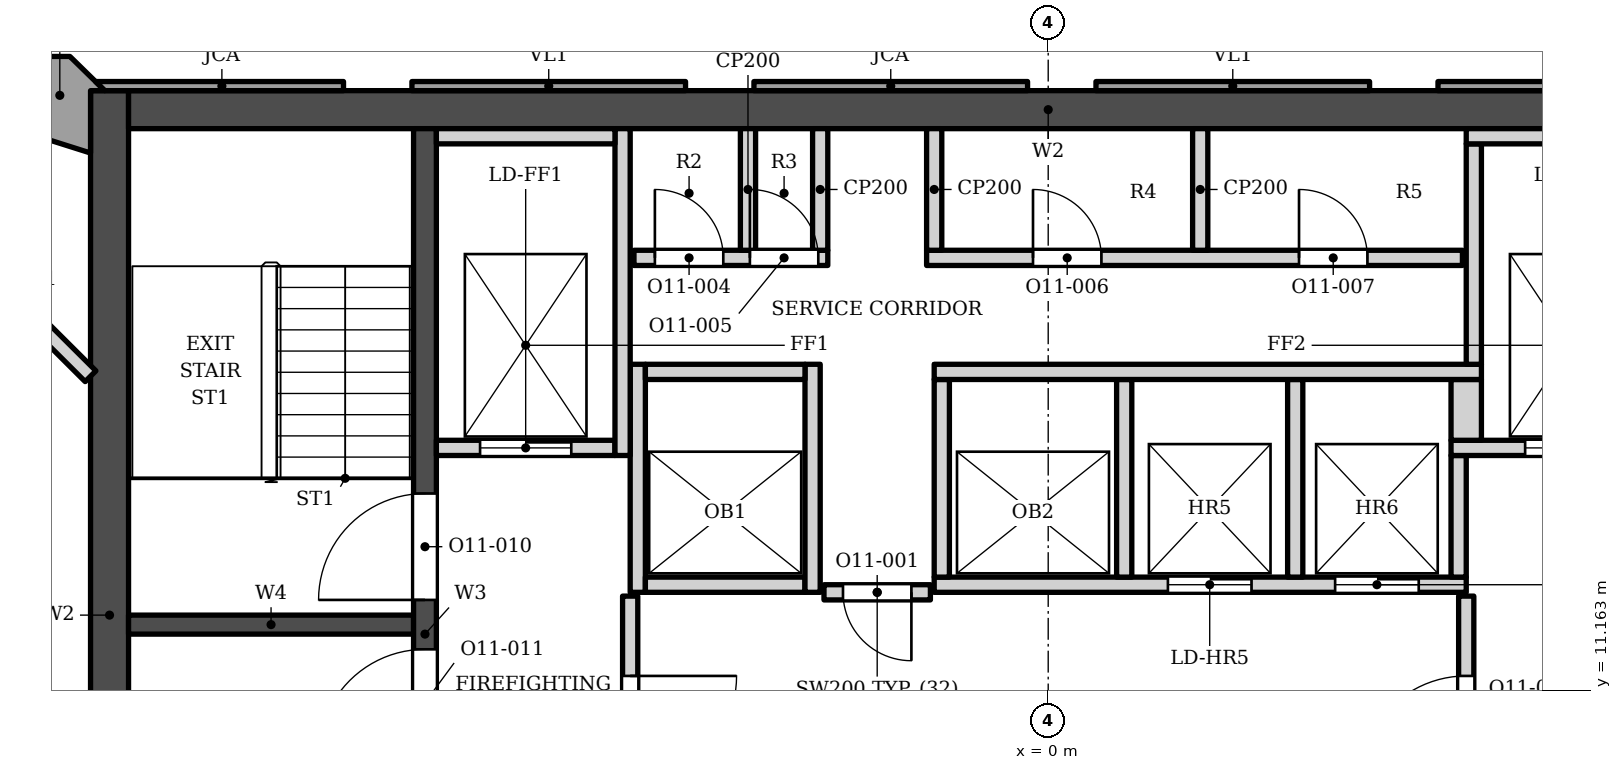
"""IFC4 building model, lengths in metres.
Left out: names, types, materials, properties, quantities, classifications, styles, units other than length and angle.
Written with IfcOpenShell. Run it as: python <this file> out.ifc"""

import sys

from ifc_helpers import new_model, si_unit, direction, frame, frame_2d, origin, place, context, subcontext, project, spatial, polyline, rectangle, outline, extrude, element, fill, save


model = new_model("IFC4")
c1 = context("Model", 3, precision=1e-05, world=origin(), true_north=direction((0.0, 1.0)))
c2 = subcontext(c1, "Body", "Model", "MODEL_VIEW")
j1 = project(units=[si_unit("LENGTHUNIT", "METRE"), si_unit("PLANEANGLEUNIT", "RADIAN")], contexts=[c1])
p1 = place(None, origin())
s1 = spatial("IfcSite", under=j1, at=p1, CompositionType="ELEMENT")
p2 = place(p1, origin())
s2 = spatial("IfcBuilding", under=s1, at=p2, CompositionType="ELEMENT")
p3 = place(p2, frame((0.0, 0.0, 271.6)))
s3 = spatial("IfcBuildingStorey", under=s2, at=p3, CompositionType="ELEMENT", Elevation=271.6)
p4 = place(p3, frame((-12.1, 18.802, 0.0), z_axis=(0.0, 0.0, 1.0), x_axis=(1.0, 0.0, 0.0)))
e1 = element("IfcWall", 1, at=p4, inside=s3, PredefinedType="SHEAR", context=c2, shape_type="SweptSolid", body=[
    extrude(rectangle(XDim=24.2, YDim=0.5, at=frame_2d((12.1, 0.0))), origin(), (0.0, 0.0, 1.0), 3.9),
])
p5 = place(p3, frame((-12.35, 5.253, 0.0), z_axis=(0.0, 0.0, 1.0), x_axis=(0.0, 1.0, 0.0)))
e2 = element("IfcWall", 2, at=p5, inside=s3, PredefinedType="SHEAR", context=c2, shape_type="SweptSolid", body=[
    extrude(rectangle(XDim=13.8, YDim=0.5, at=frame_2d((6.9, 0.0))), origin(), (0.0, 0.0, 1.0), 3.9),
])
p6 = place(p3, frame((-8.2, 5.253, 0.0), z_axis=(0.0, 0.0, 1.0), x_axis=(0.0, 1.0, 0.0)))
e3 = element("IfcWall", 3, at=p6, inside=s3, PredefinedType="SHEAR", context=c2, shape_type="SweptSolid", body=[
    extrude(rectangle(XDim=13.3, YDim=0.3, at=frame_2d((6.65, 0.0))), origin(), (0.0, 0.0, 1.0), 3.9),
])
p7 = place(p6, frame((7.1, 0.0, 0.0)))
e4 = element("IfcOpeningElement", 4, at=p7, cuts=e3, PredefinedType="OPENING", context=c2, shape_type="SweptSolid", body=[
    extrude(rectangle(XDim=1.4, YDim=2.1, at=frame_2d((0.7, 1.05))), frame((0.0, 0.16, 0.0), z_axis=(0.0, -1.0, 0.0), x_axis=(1.0, 0.0, 0.0)), (0.0, 0.0, 1.0), 0.32),
])
p8 = place(p6, frame((5.05, 0.0, 0.0)))
e5 = element("IfcOpeningElement", 5, at=p8, cuts=e3, PredefinedType="OPENING", context=c2, shape_type="SweptSolid", body=[
    extrude(rectangle(XDim=1.4, YDim=2.1, at=frame_2d((0.7, 1.05))), frame((0.0, 0.16, 0.0), z_axis=(0.0, -1.0, 0.0), x_axis=(1.0, 0.0, 0.0)), (0.0, 0.0, 1.0), 0.32),
])
p9 = place(p3, frame((-12.1, 12.028, 0.0), z_axis=(0.0, 0.0, 1.0), x_axis=(1.0, 0.0, 0.0)))
e6 = element("IfcWall", 6, at=p9, inside=s3, PredefinedType="SHEAR", context=c2, shape_type="SweptSolid", body=[
    extrude(rectangle(XDim=3.75, YDim=0.25, at=frame_2d((1.875, 0.0))), origin(), (0.0, 0.0, 1.0), 3.9),
])
p10 = place(p3, origin())
e7 = element("IfcWall", 7, at=p10, inside=s3, PredefinedType="SOLIDWALL", context=c2, shape_type="SweptSolid", body=[
    extrude(outline(polyline([(-12.412, 19.052), (-12.872, 19.502), (-13.771, 19.502), (-13.771, 18.603), (-12.6, 18.232), (-12.6, 19.052), (-12.412, 19.052)])), origin(), (0.0, 0.0, 1.0), 3.0),
])
p11 = place(p3, origin())
e8 = element("IfcWall", 8, at=p11, inside=s3, PredefinedType="SOLIDWALL", context=c2, shape_type="SweptSolid", body=[
    extrude(outline(polyline([(5.128, 19.173), (5.128, 19.052), (8.729, 19.052), (8.729, 19.173), (5.128, 19.173)])), origin(), (0.0, 0.0, 1.0), 3.0),
])
p12 = place(p3, origin())
e9 = element("IfcWall", 9, at=p12, inside=s3, PredefinedType="ELEMENTEDWALL", context=c2, shape_type="SweptSolid", body=[
    extrude(outline(polyline([(0.628, 19.173), (0.628, 19.052), (4.229, 19.052), (4.229, 19.173), (0.628, 19.173)])), origin(), (0.0, 0.0, 1.0), 3.0),
])
p13 = place(p3, origin())
e10 = element("IfcWall", 10, at=p13, inside=s3, PredefinedType="SOLIDWALL", context=c2, shape_type="SweptSolid", body=[
    extrude(outline(polyline([(-3.872, 19.173), (-3.872, 19.052), (-0.271, 19.052), (-0.271, 19.173), (-3.872, 19.173)])), origin(), (0.0, 0.0, 1.0), 3.0),
])
p14 = place(p3, origin())
e11 = element("IfcWall", 11, at=p14, inside=s3, PredefinedType="ELEMENTEDWALL", context=c2, shape_type="SweptSolid", body=[
    extrude(outline(polyline([(-8.372, 19.173), (-8.372, 19.052), (-4.771, 19.052), (-4.771, 19.173), (-8.372, 19.173)])), origin(), (0.0, 0.0, 1.0), 3.0),
])
p15 = place(p3, origin())
e12 = element("IfcWall", 12, at=p15, inside=s3, PredefinedType="SOLIDWALL", context=c2, shape_type="SweptSolid", body=[
    extrude(outline(polyline([(-12.411, 19.052), (-9.271, 19.052), (-9.271, 19.173), (-12.533, 19.173), (-12.411, 19.052)])), origin(), (0.0, 0.0, 1.0), 3.0),
])
p16 = place(p3, frame((-5.5, 9.103, 0.0), z_axis=(0.0, 0.0, 1.0), x_axis=(0.0, 1.0, 0.0)))
e13 = element("IfcWall", 13, at=p16, inside=s3, PredefinedType="SOLIDWALL", context=c2, shape_type="SweptSolid", body=[
    extrude(rectangle(XDim=3.3, YDim=0.2, at=frame_2d((1.65, 0.0))), origin(), (0.0, 0.0, 1.0), 3.73),
])
p17 = place(p16, frame((0.85, 0.0, 0.0)))
e14 = element("IfcOpeningElement", 14, at=p17, cuts=e13, PredefinedType="OPENING", context=c2, shape_type="SweptSolid", body=[
    extrude(rectangle(XDim=1.4, YDim=2.1, at=frame_2d((0.7, 1.05))), frame((0.0, 0.11, 0.0), z_axis=(0.0, -1.0, 0.0), x_axis=(1.0, 0.0, 0.0)), (0.0, 0.0, 1.0), 0.22),
])
p18 = place(p3, frame((5.5, 9.103, 0.0), z_axis=(0.0, 0.0, 1.0), x_axis=(0.0, 1.0, 0.0)))
e15 = element("IfcWall", 15, at=p18, inside=s3, PredefinedType="SOLIDWALL", context=c2, shape_type="SweptSolid", body=[
    extrude(rectangle(XDim=3.3, YDim=0.2, at=frame_2d((1.65, 0.0))), origin(), (0.0, 0.0, 1.0), 3.73),
])
p19 = place(p18, frame((0.85, 0.0, 0.0)))
e16 = element("IfcOpeningElement", 16, at=p19, cuts=e15, PredefinedType="OPENING", context=c2, shape_type="SweptSolid", body=[
    extrude(rectangle(XDim=1.4, YDim=2.1, at=frame_2d((0.7, 1.05))), frame((0.0, 0.11, 0.0), z_axis=(0.0, -1.0, 0.0), x_axis=(1.0, 0.0, 0.0)), (0.0, 0.0, 1.0), 0.22),
])
p20 = place(p3, frame((-2.95, 12.453, 0.0), z_axis=(0.0, 0.0, 1.0), x_axis=(1.0, 0.0, 0.0)))
e17 = element("IfcWall", 17, at=p20, inside=s3, PredefinedType="SOLIDWALL", context=c2, shape_type="SweptSolid", body=[
    extrude(rectangle(XDim=1.4, YDim=0.2, at=frame_2d((0.7, 0.0))), origin(), (0.0, 0.0, 1.0), 3.73),
])
p21 = place(p20, frame((0.25, 0.0, 0.0)))
e18 = element("IfcOpeningElement", 18, at=p21, cuts=e17, PredefinedType="OPENING", context=c2, shape_type="SweptSolid", body=[
    extrude(rectangle(XDim=0.9, YDim=2.1, at=frame_2d((0.45, 1.05))), frame((0.0, 0.11, 0.0), z_axis=(0.0, -1.0, 0.0), x_axis=(1.0, 0.0, 0.0)), (0.0, 0.0, 1.0), 0.22),
])
p22 = place(p3, frame((-5.4, 12.453, 0.0), z_axis=(0.0, 0.0, 1.0), x_axis=(0.0, 1.0, 0.0)))
e19 = element("IfcWall", 19, at=p22, inside=s3, PredefinedType="SOLIDWALL", context=c2, shape_type="SweptSolid", body=[
    extrude(rectangle(XDim=3.0, YDim=0.2, at=frame_2d((1.5, 0.0))), origin(), (0.0, 0.0, 1.0), 3.73),
])
p23 = place(p3, frame((-5.3, 12.552, 0.0), z_axis=(0.0, 0.0, 1.0), x_axis=(1.0, 0.0, 0.0)))
e20 = element("IfcWall", 20, at=p23, inside=s3, PredefinedType="SOLIDWALL", context=c2, shape_type="SweptSolid", body=[
    extrude(rectangle(XDim=2.1, YDim=0.2, at=frame_2d((1.05, 0.0))), origin(), (0.0, 0.0, 1.0), 3.73),
])
p24 = place(p3, frame((-3.1, 12.453, 0.0), z_axis=(0.0, 0.0, 1.0), x_axis=(0.0, 1.0, 0.0)))
e21 = element("IfcWall", 21, at=p24, inside=s3, PredefinedType="SOLIDWALL", context=c2, shape_type="SweptSolid", body=[
    extrude(rectangle(XDim=3.0, YDim=0.2, at=frame_2d((1.5, 0.0))), origin(), (0.0, 0.0, 1.0), 3.73),
])
p25 = place(p3, frame((-1.5, 12.552, 0.0), z_axis=(0.0, 0.0, 1.0), x_axis=(1.0, 0.0, 0.0)))
e22 = element("IfcWall", 22, at=p25, inside=s3, PredefinedType="SOLIDWALL", context=c2, shape_type="SweptSolid", body=[
    extrude(rectangle(XDim=7.0, YDim=0.2, at=frame_2d((3.5, 0.0))), origin(), (0.0, 0.0, 1.0), 3.73),
])
p26 = place(p25, frame((3.075, 0.0, 0.0)))
e23 = element("IfcOpeningElement", 23, at=p26, cuts=e22, PredefinedType="OPENING", context=c2, shape_type="SweptSolid", body=[
    extrude(rectangle(XDim=1.1, YDim=2.1, at=frame_2d((0.55, 1.05))), frame((0.0, 0.11, 0.0), z_axis=(0.0, -1.0, 0.0), x_axis=(1.0, 0.0, 0.0)), (0.0, 0.0, 1.0), 0.22),
])
p27 = place(p25, frame((5.275, 0.0, 0.0)))
e24 = element("IfcOpeningElement", 24, at=p27, cuts=e22, PredefinedType="OPENING", context=c2, shape_type="SweptSolid", body=[
    extrude(rectangle(XDim=1.1, YDim=2.1, at=frame_2d((0.55, 1.05))), frame((0.0, 0.11, 0.0), z_axis=(0.0, -1.0, 0.0), x_axis=(1.0, 0.0, 0.0)), (0.0, 0.0, 1.0), 0.22),
])
for number, where, z_axis, x_axis in (
    (25, (-1.4, 12.653, 0.0), (0.0, 0.0, 1.0), (0.0, 1.0, 0.0)),
    (26, (1.0, 12.653, 0.0), (0.0, 0.0, 1.0), (0.0, 1.0, 0.0)),
    (27, (3.25, 12.653, 0.0), (0.0, 0.0, 1.0), (0.0, 1.0, 0.0)),
):
    element("IfcWall", number, at=place(p3, frame(where, z_axis=z_axis, x_axis=x_axis)), inside=s3, PredefinedType="SOLIDWALL", context=c2, shape_type="SweptSolid", body=[
        extrude(rectangle(XDim=2.6, YDim=0.2, at=frame_2d((1.3, 0.0))), origin(), (0.0, 0.0, 1.0), 3.73),
    ])
p28 = place(p3, frame((5.4, 12.653, 0.0), z_axis=(0.0, 0.0, 1.0), x_axis=(0.0, 1.0, 0.0)))
e28 = element("IfcWall", 28, at=p28, inside=s3, PredefinedType="SOLIDWALL", context=c2, shape_type="SweptSolid", body=[
    extrude(rectangle(XDim=1.6, YDim=0.2, at=frame_2d((0.8, 0.0))), origin(), (0.0, 0.0, 1.0), 3.73),
])
p29 = place(p3, frame((-8.05, 14.353, 0.0), z_axis=(0.0, 0.0, 1.0), x_axis=(1.0, 0.0, 0.0)))
e29 = element("IfcWall", 29, at=p29, inside=s3, PredefinedType="SOLIDWALL", context=c2, shape_type="SweptSolid", body=[
    extrude(rectangle(XDim=2.35, YDim=0.2, at=frame_2d((1.175, 0.0))), origin(), (0.0, 0.0, 1.0), 3.73),
])
p30 = place(p29, frame((0.575, 0.0, 0.0)))
e30 = element("IfcOpeningElement", 30, at=p30, cuts=e29, PredefinedType="OPENING", context=c2, shape_type="SweptSolid", body=[
    extrude(rectangle(XDim=1.2, YDim=2.1, at=frame_2d((0.6, 1.05))), frame((0.0, 0.11, 0.0), z_axis=(0.0, -1.0, 0.0), x_axis=(1.0, 0.0, 0.0)), (0.0, 0.0, 1.0), 0.22),
])
p31 = place(p3, frame((-5.6, 14.253, 0.0), z_axis=(0.0, 0.0, 1.0), x_axis=(0.0, 1.0, 0.0)))
e31 = element("IfcWall", 31, at=p31, inside=s3, PredefinedType="SOLIDWALL", context=c2, shape_type="SweptSolid", body=[
    extrude(rectangle(XDim=4.3, YDim=0.2, at=frame_2d((2.15, 0.0))), origin(), (0.0, 0.0, 1.0), 3.73),
])
p32 = place(p3, frame((5.3, 14.353, 0.0), z_axis=(0.0, 0.0, 1.0), x_axis=(1.0, 0.0, 0.0)))
e32 = element("IfcWall", 32, at=p32, inside=s3, PredefinedType="SOLIDWALL", context=c2, shape_type="SweptSolid", body=[
    extrude(rectangle(XDim=2.75, YDim=0.2, at=frame_2d((1.375, 0.0))), origin(), (0.0, 0.0, 1.0), 3.73),
])
p33 = place(p32, frame((0.975, 0.0, 0.0)))
e33 = element("IfcOpeningElement", 33, at=p33, cuts=e32, PredefinedType="OPENING", context=c2, shape_type="SweptSolid", body=[
    extrude(rectangle(XDim=1.2, YDim=2.1, at=frame_2d((0.6, 1.05))), frame((0.0, 0.11, 0.0), z_axis=(0.0, -1.0, 0.0), x_axis=(1.0, 0.0, 0.0)), (0.0, 0.0, 1.0), 0.22),
])
p34 = place(p3, frame((5.5, 14.453, 0.0), z_axis=(0.0, 0.0, 1.0), x_axis=(0.0, 1.0, 0.0)))
e34 = element("IfcWall", 34, at=p34, inside=s3, PredefinedType="SOLIDWALL", context=c2, shape_type="SweptSolid", body=[
    extrude(rectangle(XDim=0.8, YDim=0.4, at=frame_2d((0.4, 0.0))), origin(), (0.0, 0.0, 1.0), 3.73),
])
p35 = place(p3, frame((-5.3, 15.353, 0.0), z_axis=(0.0, 0.0, 1.0), x_axis=(1.0, 0.0, 0.0)))
e35 = element("IfcWall", 35, at=p35, inside=s3, PredefinedType="SOLIDWALL", context=c2, shape_type="SweptSolid", body=[
    extrude(rectangle(XDim=2.1, YDim=0.2, at=frame_2d((1.05, 0.0))), origin(), (0.0, 0.0, 1.0), 3.73),
])
p36 = place(p3, frame((-1.5, 15.353, 0.0), z_axis=(0.0, 0.0, 1.0), x_axis=(1.0, 0.0, 0.0)))
e36 = element("IfcWall", 36, at=p36, inside=s3, PredefinedType="SOLIDWALL", context=c2, shape_type="SweptSolid", body=[
    extrude(rectangle(XDim=7.2, YDim=0.2, at=frame_2d((3.6, 0.0))), origin(), (0.0, 0.0, 1.0), 3.73),
])
p37 = place(p3, frame((5.6, 15.453, 0.0), z_axis=(0.0, 0.0, 1.0), x_axis=(0.0, 1.0, 0.0)))
e37 = element("IfcWall", 37, at=p37, inside=s3, PredefinedType="SOLIDWALL", context=c2, shape_type="SweptSolid", body=[
    extrude(rectangle(XDim=2.9, YDim=0.2, at=frame_2d((1.45, 0.0))), origin(), (0.0, 0.0, 1.0), 3.73),
])
p38 = place(p3, frame((-5.45, 16.853, 0.0), z_axis=(0.0, 0.0, 1.0), x_axis=(1.0, 0.0, 0.0)))
e38 = element("IfcWall", 38, at=p38, inside=s3, PredefinedType="SOLIDWALL", context=c2, shape_type="SweptSolid", body=[
    extrude(rectangle(XDim=2.55, YDim=0.2, at=frame_2d((1.275, 0.0))), origin(), (0.0, 0.0, 1.0), 3.73),
])
p39 = place(p38, frame((0.275, 0.0, 0.0)))
e39 = element("IfcOpeningElement", 39, at=p39, cuts=e38, PredefinedType="OPENING", context=c2, shape_type="SweptSolid", body=[
    extrude(rectangle(XDim=0.9, YDim=2.1, at=frame_2d((0.45, 1.05))), frame((0.0, 0.11, 0.0), z_axis=(0.0, -1.0, 0.0), x_axis=(1.0, 0.0, 0.0)), (0.0, 0.0, 1.0), 0.22),
])
p40 = place(p38, frame((1.525, 0.0, 0.0)))
e40 = element("IfcOpeningElement", 40, at=p40, cuts=e38, PredefinedType="OPENING", context=c2, shape_type="SweptSolid", body=[
    extrude(rectangle(XDim=0.9, YDim=2.1, at=frame_2d((0.45, 1.05))), frame((0.0, 0.11, 0.0), z_axis=(0.0, -1.0, 0.0), x_axis=(1.0, 0.0, 0.0)), (0.0, 0.0, 1.0), 0.22),
])
p41 = place(p3, frame((-1.6, 16.853, 0.0), z_axis=(0.0, 0.0, 1.0), x_axis=(1.0, 0.0, 0.0)))
e41 = element("IfcWall", 41, at=p41, inside=s3, PredefinedType="SOLIDWALL", context=c2, shape_type="SweptSolid", body=[
    extrude(rectangle(XDim=7.05, YDim=0.2, at=frame_2d((3.525, 0.0))), origin(), (0.0, 0.0, 1.0), 3.73),
])
p42 = place(p41, frame((1.4, 0.0, 0.0)))
e42 = element("IfcOpeningElement", 42, at=p42, cuts=e41, PredefinedType="OPENING", context=c2, shape_type="SweptSolid", body=[
    extrude(rectangle(XDim=0.9, YDim=2.1, at=frame_2d((0.45, 1.05))), frame((0.0, 0.11, 0.0), z_axis=(0.0, -1.0, 0.0), x_axis=(1.0, 0.0, 0.0)), (0.0, 0.0, 1.0), 0.22),
])
p43 = place(p41, frame((4.9, 0.0, 0.0)))
e43 = element("IfcOpeningElement", 43, at=p43, cuts=e41, PredefinedType="OPENING", context=c2, shape_type="SweptSolid", body=[
    extrude(rectangle(XDim=0.9, YDim=2.1, at=frame_2d((0.45, 1.05))), frame((0.0, 0.11, 0.0), z_axis=(0.0, -1.0, 0.0), x_axis=(1.0, 0.0, 0.0)), (0.0, 0.0, 1.0), 0.22),
])
for number, where, z_axis, x_axis in (
    (44, (-3.95, 16.953, 0.0), (0.0, 0.0, 1.0), (0.0, 1.0, 0.0)),
    (45, (-3.0, 16.953, 0.0), (0.0, 0.0, 1.0), (0.0, 1.0, 0.0)),
    (46, (-1.5, 16.953, 0.0), (0.0, 0.0, 1.0), (0.0, 1.0, 0.0)),
    (47, (2.0, 16.953, 0.0), (0.0, 0.0, 1.0), (0.0, 1.0, 0.0)),
):
    element("IfcWall", number, at=place(p3, frame(where, z_axis=z_axis, x_axis=x_axis)), inside=s3, PredefinedType="PARTITIONING", context=c2, shape_type="SweptSolid", body=[
        extrude(rectangle(XDim=1.6, YDim=0.2, at=frame_2d((0.8, 0.0))), origin(), (0.0, 0.0, 1.0), 3.73),
    ])
p44 = place(p3, frame((-8.05, 18.453, 0.0), z_axis=(0.0, 0.0, 1.0), x_axis=(1.0, 0.0, 0.0)))
e48 = element("IfcWall", 48, at=p44, inside=s3, PredefinedType="SOLIDWALL", context=c2, shape_type="SweptSolid", body=[
    extrude(rectangle(XDim=2.35, YDim=0.2, at=frame_2d((1.175, 0.0))), origin(), (0.0, 0.0, 1.0), 3.73),
])
p45 = place(p3, frame((5.5, 18.453, 0.0), z_axis=(0.0, 0.0, 1.0), x_axis=(1.0, 0.0, 0.0)))
e49 = element("IfcWall", 49, at=p45, inside=s3, PredefinedType="SOLIDWALL", context=c2, shape_type="SweptSolid", body=[
    extrude(rectangle(XDim=2.55, YDim=0.2, at=frame_2d((1.275, 0.0))), origin(), (0.0, 0.0, 1.0), 3.73),
])
p46 = place(p3, frame((-13.26, 15.953, 0.0), z_axis=(0.0, 0.0, 1.0), x_axis=(0.708285399161, -0.705926195389, 0.0)))
e50 = element("IfcWall", 50, at=p46, inside=s3, PredefinedType="PARTITIONING", context=c2, shape_type="SweptSolid", body=[
    extrude(rectangle(XDim=0.931, YDim=0.2, at=frame_2d((0.466, 0.0))), origin(), (0.0, 0.0, 1.0), 3.73),
])
p47 = place(p26, origin())
e51 = element("IfcDoor", 51, at=p47, inside=s3, OperationType="DOUBLE_DOOR_SLIDING", PredefinedType="DOOR", context=c2, shape_type="SweptSolid", body=[
    extrude(rectangle(XDim=1.1, YDim=2.1, at=frame_2d((0.55, 1.05))), frame((0.0, 0.025, 0.0), z_axis=(0.0, -1.0, 0.0), x_axis=(1.0, 0.0, 0.0)), (0.0, 0.0, 1.0), 0.05),
])
fill(e23, e51)
p48 = place(p27, origin())
e52 = element("IfcDoor", 52, at=p48, inside=s3, OperationType="DOUBLE_DOOR_SLIDING", PredefinedType="DOOR", context=c2, shape_type="SweptSolid", body=[
    extrude(rectangle(XDim=1.1, YDim=2.1, at=frame_2d((0.55, 1.05))), frame((0.0, 0.025, 0.0), z_axis=(0.0, -1.0, 0.0), x_axis=(1.0, 0.0, 0.0)), (0.0, 0.0, 1.0), 0.05),
])
fill(e24, e52)
p49 = place(p30, origin())
e53 = element("IfcDoor", 53, at=p49, inside=s3, OperationType="DOUBLE_DOOR_SLIDING", PredefinedType="DOOR", context=c2, shape_type="SweptSolid", body=[
    extrude(rectangle(XDim=1.2, YDim=2.1, at=frame_2d((0.6, 1.05))), frame((0.0, 0.025, 0.0), z_axis=(0.0, -1.0, 0.0), x_axis=(1.0, 0.0, 0.0)), (0.0, 0.0, 1.0), 0.05),
])
fill(e30, e53)
p50 = place(p33, origin())
e54 = element("IfcDoor", 54, at=p50, inside=s3, OperationType="DOUBLE_DOOR_SLIDING", PredefinedType="DOOR", context=c2, shape_type="SweptSolid", body=[
    extrude(rectangle(XDim=1.2, YDim=2.1, at=frame_2d((0.6, 1.05))), frame((0.0, 0.025, 0.0), z_axis=(0.0, -1.0, 0.0), x_axis=(1.0, 0.0, 0.0)), (0.0, 0.0, 1.0), 0.05),
])
fill(e33, e54)
p51 = place(p7, origin())
e55 = element("IfcDoor", 55, at=p51, inside=s3, OperationType="SINGLE_SWING_LEFT", PredefinedType="DOOR", context=c2, shape_type="SweptSolid", body=[
    extrude(rectangle(XDim=1.4, YDim=2.1, at=frame_2d((0.7, 1.05))), frame((0.0, 0.025, 0.0), z_axis=(0.0, -1.0, 0.0), x_axis=(1.0, 0.0, 0.0)), (0.0, 0.0, 1.0), 0.05),
])
fill(e4, e55)
p52 = place(p8, origin())
e56 = element("IfcDoor", 56, at=p52, inside=s3, OperationType="SINGLE_SWING_LEFT", PredefinedType="DOOR", context=c2, shape_type="SweptSolid", body=[
    extrude(rectangle(XDim=1.4, YDim=2.1, at=frame_2d((0.7, 1.05))), frame((0.0, 0.025, 0.0), z_axis=(0.0, -1.0, 0.0), x_axis=(1.0, 0.0, 0.0)), (0.0, 0.0, 1.0), 0.05),
])
fill(e5, e56)
p53 = place(p21, origin())
e57 = element("IfcDoor", 57, at=p53, inside=s3, OperationType="SINGLE_SWING_RIGHT", PredefinedType="DOOR", context=c2, shape_type="SweptSolid", body=[
    extrude(rectangle(XDim=0.9, YDim=2.1, at=frame_2d((0.45, 1.05))), frame((0.0, 0.025, 0.0), z_axis=(0.0, -1.0, 0.0), x_axis=(1.0, 0.0, 0.0)), (0.0, 0.0, 1.0), 0.05),
])
fill(e18, e57)
p54 = place(p17, origin())
e58 = element("IfcDoor", 58, at=p54, inside=s3, OperationType="SINGLE_SWING_RIGHT", PredefinedType="DOOR", context=c2, shape_type="SweptSolid", body=[
    extrude(rectangle(XDim=1.4, YDim=2.1, at=frame_2d((0.7, 1.05))), frame((0.0, 0.025, 0.0), z_axis=(0.0, -1.0, 0.0), x_axis=(1.0, 0.0, 0.0)), (0.0, 0.0, 1.0), 0.05),
])
fill(e14, e58)
p55 = place(p19, origin())
e59 = element("IfcDoor", 59, at=p55, inside=s3, OperationType="SINGLE_SWING_LEFT", PredefinedType="DOOR", context=c2, shape_type="SweptSolid", body=[
    extrude(rectangle(XDim=1.4, YDim=2.1, at=frame_2d((0.7, 1.05))), frame((0.0, 0.025, 0.0), z_axis=(0.0, -1.0, 0.0), x_axis=(1.0, 0.0, 0.0)), (0.0, 0.0, 1.0), 0.05),
])
fill(e16, e59)
p56 = place(p39, origin())
e60 = element("IfcDoor", 60, at=p56, inside=s3, OperationType="SINGLE_SWING_LEFT", PredefinedType="DOOR", context=c2, shape_type="SweptSolid", body=[
    extrude(rectangle(XDim=0.9, YDim=2.1, at=frame_2d((0.45, 1.05))), frame((0.0, 0.025, 0.0), z_axis=(0.0, -1.0, 0.0), x_axis=(1.0, 0.0, 0.0)), (0.0, 0.0, 1.0), 0.05),
])
fill(e39, e60)
p57 = place(p40, origin())
e61 = element("IfcDoor", 61, at=p57, inside=s3, OperationType="SINGLE_SWING_LEFT", PredefinedType="DOOR", context=c2, shape_type="SweptSolid", body=[
    extrude(rectangle(XDim=0.9, YDim=2.1, at=frame_2d((0.45, 1.05))), frame((0.0, 0.025, 0.0), z_axis=(0.0, -1.0, 0.0), x_axis=(1.0, 0.0, 0.0)), (0.0, 0.0, 1.0), 0.05),
])
fill(e40, e61)
p58 = place(p42, origin())
e62 = element("IfcDoor", 62, at=p58, inside=s3, OperationType="SINGLE_SWING_LEFT", PredefinedType="DOOR", context=c2, shape_type="SweptSolid", body=[
    extrude(rectangle(XDim=0.9, YDim=2.1, at=frame_2d((0.45, 1.05))), frame((0.0, 0.025, 0.0), z_axis=(0.0, -1.0, 0.0), x_axis=(1.0, 0.0, 0.0)), (0.0, 0.0, 1.0), 0.05),
])
fill(e42, e62)
p59 = place(p43, origin())
e63 = element("IfcDoor", 63, at=p59, inside=s3, OperationType="SINGLE_SWING_LEFT", PredefinedType="DOOR", context=c2, shape_type="SweptSolid", body=[
    extrude(rectangle(XDim=0.9, YDim=2.1, at=frame_2d((0.45, 1.05))), frame((0.0, 0.025, 0.0), z_axis=(0.0, -1.0, 0.0), x_axis=(1.0, 0.0, 0.0)), (0.0, 0.0, 1.0), 0.05),
])
fill(e43, e63)
save(model, sys.argv[1])
